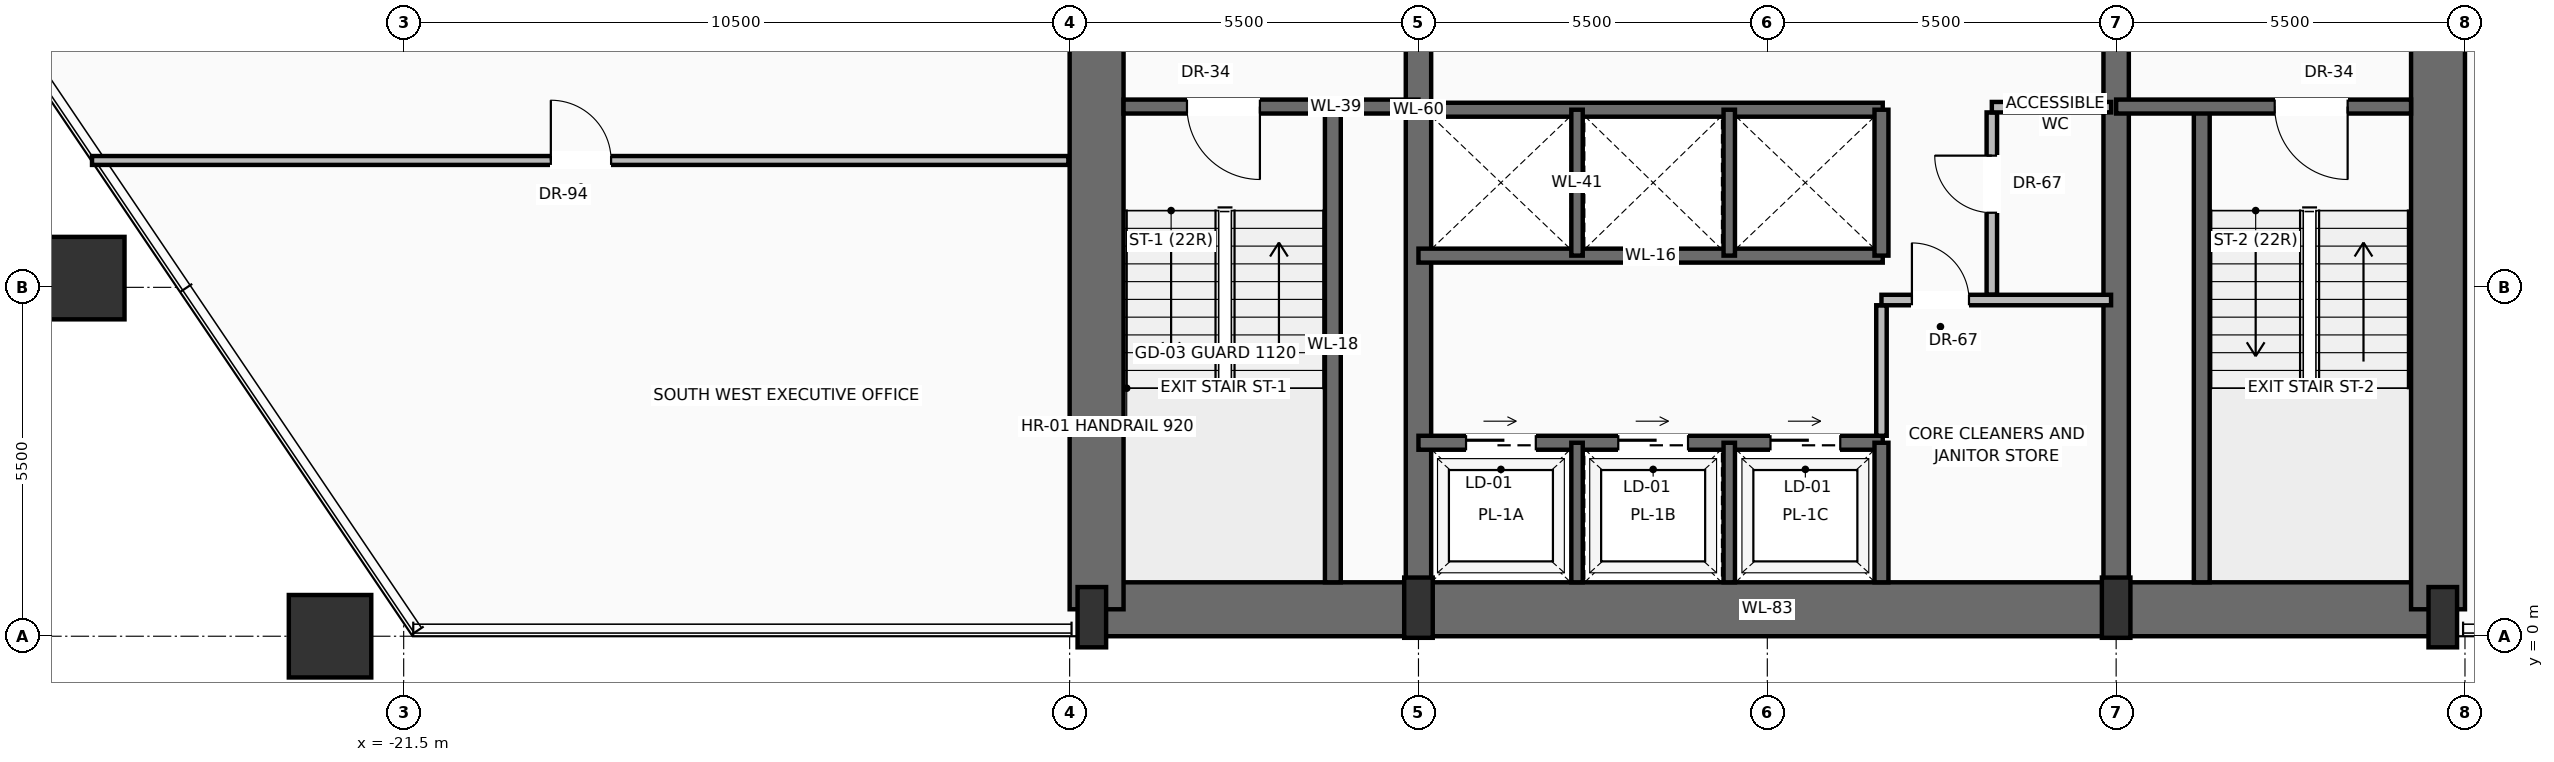
"""IFC4 building model, lengths in metres.
Left out: names, types, materials, properties, quantities, classifications, styles, units other than length and angle.
Written with IfcOpenShell. Run it as: python <this file> out.ifc"""

import sys

from ifc_helpers import new_model, si_unit, direction, frame, frame_2d, origin, origin_2d, place, context, subcontext, project, spatial, rectangle, hollow_rectangle, extrude, source, transform, mapped, element, fill, save


model = new_model("IFC4")
c1 = context("Model", 3, precision=1e-05, world=origin(), true_north=direction((0.0, 1.0)))
c2 = subcontext(c1, "Body", "Model", "MODEL_VIEW")
j1 = project(units=[si_unit("LENGTHUNIT", "METRE"), si_unit("PLANEANGLEUNIT", "RADIAN")], contexts=[c1])
p1 = place(None, origin())
s1 = spatial("IfcSite", under=j1, at=p1, CompositionType="ELEMENT")
p2 = place(p1, origin())
s2 = spatial("IfcBuilding", under=s1, at=p2, CompositionType="ELEMENT")
p3 = place(p2, frame((0.0, 0.0, 38.6)))
s3 = spatial("IfcBuildingStorey", under=s2, at=p3, CompositionType="ELEMENT", Elevation=38.6)
p4 = place(p3, frame((-10.65, 0.425, 0.0), z_axis=(0.0, 0.0, 1.0), x_axis=(1.0, 0.0, 0.0)))
e1 = element("IfcWall", 1, at=p4, inside=s3, PredefinedType="SHEAR", context=c2, shape_type="SweptSolid", body=[
    extrude(rectangle(XDim=21.3, YDim=0.85, at=frame_2d((10.65, 0.0))), origin(), (0.0, 0.0, 1.0), 3.45),
])
for number, where, z_axis, x_axis in (
    (2, (-10.575, 0.425, 0.0), (0.0, 0.0, 1.0), (0.0, 1.0, 0.0)),
    (3, (10.575, 0.425, 0.0), (0.0, 0.0, 1.0), (0.0, 1.0, 0.0)),
):
    element("IfcWall", number, at=place(p3, frame(where, z_axis=z_axis, x_axis=x_axis)), inside=s3, PredefinedType="SHEAR", context=c2, shape_type="SweptSolid", body=[
        extrude(rectangle(XDim=15.75, YDim=0.85, at=frame_2d((7.875, 0.0))), origin(), (0.0, 0.0, 1.0), 3.45),
    ])
p5 = place(p3, frame((-5.5, 0.425, 0.0), z_axis=(0.0, 0.0, 1.0), x_axis=(0.0, 1.0, 0.0)))
e4 = element("IfcWall", 4, at=p5, inside=s3, PredefinedType="SHEAR", context=c2, shape_type="SweptSolid", body=[
    extrude(rectangle(XDim=15.75, YDim=0.4, at=frame_2d((7.875, 0.0))), origin(), (0.0, 0.0, 1.0), 3.45),
])
p6 = place(p5, frame((9.075, 0.0, 0.0)))
e5 = element("IfcOpeningElement", 5, at=p6, cuts=e4, PredefinedType="OPENING", context=c2, shape_type="SweptSolid", body=[
    extrude(rectangle(XDim=1.1, YDim=2.2, at=frame_2d((0.55, 1.1))), frame((0.0, 0.21, 0.0), z_axis=(0.0, -1.0, 0.0), x_axis=(1.0, 0.0, 0.0)), (0.0, 0.0, 1.0), 0.42),
])
p7 = place(p3, frame((5.5, 0.425, 0.0), z_axis=(0.0, 0.0, 1.0), x_axis=(0.0, 1.0, 0.0)))
e6 = element("IfcWall", 6, at=p7, inside=s3, PredefinedType="SHEAR", context=c2, shape_type="SweptSolid", body=[
    extrude(rectangle(XDim=15.75, YDim=0.4, at=frame_2d((7.875, 0.0))), origin(), (0.0, 0.0, 1.0), 3.45),
])
p8 = place(p7, frame((9.075, 0.0, 0.0)))
e7 = element("IfcOpeningElement", 7, at=p8, cuts=e6, PredefinedType="OPENING", context=c2, shape_type="SweptSolid", body=[
    extrude(rectangle(XDim=1.1, YDim=2.2, at=frame_2d((0.55, 1.1))), frame((0.0, 0.21, 0.0), z_axis=(0.0, -1.0, 0.0), x_axis=(1.0, 0.0, 0.0)), (0.0, 0.0, 1.0), 0.42),
])
m1 = source(origin(), c2, "Body", "SweptSolid", [
    extrude(rectangle(XDim=0.45, YDim=0.95, at=origin_2d()), origin(), (0.0, 0.0, 1.0), 3.7),
])
for number, where, z_axis, x_axis in (
    (8, (-10.65, 0.3, 0.0), (0.0, 0.0, 1.0), (1.0, 0.0, 0.0)),
    (9, (-5.5, 0.45, 0.0), (0.0, 0.0, 1.0), (1.0, 0.0, 0.0)),
    (10, (5.5, 0.45, 0.0), (0.0, 0.0, 1.0), (1.0, 0.0, 0.0)),
    (11, (10.65, 0.3, 0.0), (0.0, 0.0, 1.0), (1.0, 0.0, 0.0)),
):
    element("IfcColumn", number, at=place(p3, frame(where, z_axis=z_axis, x_axis=x_axis)), inside=s3, PredefinedType="PILASTER", context=c2, shape_type="MappedRepresentation", body=[
        mapped(m1, transform((0.0, 0.0, 0.0), scale=1.0)),
    ])
m2 = source(origin(), c2, "Body", "SweptSolid", [
    extrude(hollow_rectangle(XDim=1.3, YDim=1.3, WallThickness=0.065, at=origin_2d()), origin(), (0.0, 0.0, 1.0), 3.692),
])
p9 = place(p3, frame((-22.661, 0.0, 0.004), z_axis=(-0.018847104809, 0.0, 0.999822377545), x_axis=(0.0, -1.0, 0.0)))
e12 = element("IfcColumn", 12, at=p9, inside=s3, PredefinedType="COLUMN", context=c2, shape_type="MappedRepresentation", body=[
    mapped(m2, transform((0.0, 0.0, 0.0), scale=1.0)),
])
m3 = source(origin(), c2, "Body", "SweptSolid", [
    extrude(hollow_rectangle(XDim=1.3, YDim=1.3, WallThickness=0.065, at=origin_2d()), origin(), (0.0, 0.0, 1.0), 3.692),
])
p10 = place(p3, frame((-26.552, 5.646, 0.004), z_axis=(-0.003438820357, -0.017723151073, 0.999837018934), x_axis=(0.981691567677, -0.190477468355, 0.0)))
e13 = element("IfcColumn", 13, at=p10, inside=s3, PredefinedType="COLUMN", context=c2, shape_type="MappedRepresentation", body=[
    mapped(m3, transform((0.0, 0.0, 0.0), scale=1.0)),
])
p11 = place(p3, frame((-6.85, 0.85, 0.0), z_axis=(0.0, 0.0, 1.0), x_axis=(0.0, 1.0, 0.0)))
e14 = element("IfcWall", 14, at=p11, inside=s3, PredefinedType="SOLIDWALL", context=c2, shape_type="SweptSolid", body=[
    extrude(rectangle(XDim=7.5, YDim=0.25, at=frame_2d((3.75, 0.0))), origin(), (0.0, 0.0, 1.0), 3.45),
])
p12 = place(p3, frame((-5.5, 8.35, 0.0), z_axis=(0.0, 0.0, 1.0), x_axis=(-1.0, 0.0, 0.0)))
e15 = element("IfcWall", 15, at=p12, inside=s3, PredefinedType="SOLIDWALL", context=c2, shape_type="SweptSolid", body=[
    extrude(rectangle(XDim=4.65, YDim=0.22, at=frame_2d((2.325, 0.0))), origin(), (0.0, 0.0, 1.0), 3.45),
])
p13 = place(p12, frame((2.5, 0.0, 0.0)))
e16 = element("IfcOpeningElement", 16, at=p13, cuts=e15, PredefinedType="OPENING", context=c2, shape_type="SweptSolid", body=[
    extrude(rectangle(XDim=1.15, YDim=2.2, at=frame_2d((0.575, 1.1))), frame((0.0, 0.12, 0.0), z_axis=(0.0, -1.0, 0.0), x_axis=(1.0, 0.0, 0.0)), (0.0, 0.0, 1.0), 0.24),
])
p14 = place(p3, frame((6.85, 0.85, 0.0), z_axis=(0.0, 0.0, 1.0), x_axis=(0.0, 1.0, 0.0)))
e17 = element("IfcWall", 17, at=p14, inside=s3, PredefinedType="SOLIDWALL", context=c2, shape_type="SweptSolid", body=[
    extrude(rectangle(XDim=7.5, YDim=0.25, at=frame_2d((3.75, 0.0))), origin(), (0.0, 0.0, 1.0), 3.45),
])
p15 = place(p3, frame((10.15, 8.35, 0.0), z_axis=(0.0, 0.0, 1.0), x_axis=(-1.0, 0.0, 0.0)))
e18 = element("IfcWall", 18, at=p15, inside=s3, PredefinedType="SOLIDWALL", context=c2, shape_type="SweptSolid", body=[
    extrude(rectangle(XDim=4.65, YDim=0.22, at=frame_2d((2.325, 0.0))), origin(), (0.0, 0.0, 1.0), 3.45),
])
p16 = place(p15, frame((1.0, 0.0, 0.0)))
e19 = element("IfcOpeningElement", 19, at=p16, cuts=e18, PredefinedType="OPENING", context=c2, shape_type="SweptSolid", body=[
    extrude(rectangle(XDim=1.15, YDim=2.2, at=frame_2d((0.575, 1.1))), frame((0.0, 0.12, 0.0), z_axis=(0.0, -1.0, 0.0), x_axis=(1.0, 0.0, 0.0)), (0.0, 0.0, 1.0), 0.24),
])
p17 = place(p3, frame((-5.5, 3.05, 0.0), z_axis=(0.0, 0.0, 1.0), x_axis=(1.0, 0.0, 0.0)))
e20 = element("IfcWall", 20, at=p17, inside=s3, PredefinedType="SOLIDWALL", context=c2, shape_type="SweptSolid", body=[
    extrude(rectangle(XDim=7.32, YDim=0.22, at=frame_2d((3.66, 0.0))), origin(), (0.0, 0.0, 1.0), 3.45),
])
p18 = place(p17, frame((0.75, 0.0, 0.0)))
e21 = element("IfcOpeningElement", 21, at=p18, cuts=e20, PredefinedType="OPENING", context=c2, shape_type="SweptSolid", body=[
    extrude(rectangle(XDim=1.1, YDim=2.2, at=frame_2d((0.55, 1.1))), frame((0.0, 0.12, 0.0), z_axis=(0.0, -1.0, 0.0), x_axis=(1.0, 0.0, 0.0)), (0.0, 0.0, 1.0), 0.24),
])
p19 = place(p17, frame((3.15, 0.0, 0.0)))
e22 = element("IfcOpeningElement", 22, at=p19, cuts=e20, PredefinedType="OPENING", context=c2, shape_type="SweptSolid", body=[
    extrude(rectangle(XDim=1.1, YDim=2.2, at=frame_2d((0.55, 1.1))), frame((0.0, 0.12, 0.0), z_axis=(0.0, -1.0, 0.0), x_axis=(1.0, 0.0, 0.0)), (0.0, 0.0, 1.0), 0.24),
])
p20 = place(p17, frame((5.55, 0.0, 0.0)))
e23 = element("IfcOpeningElement", 23, at=p20, cuts=e20, PredefinedType="OPENING", context=c2, shape_type="SweptSolid", body=[
    extrude(rectangle(XDim=1.1, YDim=2.2, at=frame_2d((0.55, 1.1))), frame((0.0, 0.12, 0.0), z_axis=(0.0, -1.0, 0.0), x_axis=(1.0, 0.0, 0.0)), (0.0, 0.0, 1.0), 0.24),
])
p21 = place(p3, frame((1.8, 0.85, 0.0), z_axis=(0.0, 0.0, 1.0), x_axis=(0.0, 1.0, 0.0)))
e24 = element("IfcWall", 24, at=p21, inside=s3, PredefinedType="SOLIDWALL", context=c2, shape_type="SweptSolid", body=[
    extrude(rectangle(XDim=2.2, YDim=0.22, at=frame_2d((1.1, 0.0))), origin(), (0.0, 0.0, 1.0), 3.45),
])
for number, where, z_axis, x_axis in (
    (25, (-3.0, 0.85, 0.0), (0.0, 0.0, 1.0), (0.0, 1.0, 0.0)),
    (26, (-0.6, 0.85, 0.0), (0.0, 0.0, 1.0), (0.0, 1.0, 0.0)),
):
    element("IfcWall", number, at=place(p3, frame(where, z_axis=z_axis, x_axis=x_axis)), inside=s3, PredefinedType="SOLIDWALL", context=c2, shape_type="SweptSolid", body=[
        extrude(rectangle(XDim=2.2, YDim=0.18, at=frame_2d((1.1, 0.0))), origin(), (0.0, 0.0, 1.0), 3.45),
    ])
p22 = place(p3, frame((1.8, 3.16, 0.0), z_axis=(0.0, 0.0, 1.0), x_axis=(0.0, 1.0, 0.0)))
e27 = element("IfcWall", 27, at=p22, inside=s3, PredefinedType="PARTITIONING", context=c2, shape_type="SweptSolid", body=[
    extrude(rectangle(XDim=2.058, YDim=0.165, at=frame_2d((1.029, 0.0))), origin(), (0.0, 0.0, 1.0), 3.442),
])
p23 = place(p3, frame((3.54, 5.383, 0.0), z_axis=(0.0, 0.0, 1.0), x_axis=(0.0, 1.0, 0.0)))
e28 = element("IfcWall", 28, at=p23, inside=s3, PredefinedType="PARTITIONING", context=c2, shape_type="SweptSolid", body=[
    extrude(rectangle(XDim=2.875, YDim=0.165, at=frame_2d((1.438, 0.0))), origin(), (0.0, 0.0, 1.0), 3.442),
])
p24 = place(p23, frame((1.294, 0.0, 0.0)))
e29 = element("IfcOpeningElement", 29, at=p24, cuts=e28, PredefinedType="OPENING", context=c2, shape_type="SweptSolid", body=[
    extrude(rectangle(XDim=0.9, YDim=2.1, at=frame_2d((0.45, 1.05))), frame((0.0, 0.093, 0.0), z_axis=(0.0, -1.0, 0.0), x_axis=(1.0, 0.0, 0.0)), (0.0, 0.0, 1.0), 0.185),
])
p25 = place(p3, frame((3.54, 8.34, 0.0), z_axis=(0.0, 0.0, 1.0), x_axis=(1.0, 0.0, 0.0)))
e30 = element("IfcWall", 30, at=p25, inside=s3, PredefinedType="PARTITIONING", context=c2, shape_type="SweptSolid", body=[
    extrude(rectangle(XDim=1.88, YDim=0.165, at=frame_2d((0.94, 0.0))), origin(), (0.0, 0.0, 1.0), 3.442),
])
p26 = place(p3, frame((1.8, 5.3, 0.0), z_axis=(0.0, 0.0, 1.0), x_axis=(1.0, 0.0, 0.0)))
e31 = element("IfcWall", 31, at=p26, inside=s3, PredefinedType="PARTITIONING", context=c2, shape_type="SweptSolid", body=[
    extrude(rectangle(XDim=3.62, YDim=0.165, at=frame_2d((1.81, 0.0))), origin(), (0.0, 0.0, 1.0), 3.442),
])
p27 = place(p26, frame((0.48, 0.0, 0.0)))
e32 = element("IfcOpeningElement", 32, at=p27, cuts=e31, PredefinedType="OPENING", context=c2, shape_type="SweptSolid", body=[
    extrude(rectangle(XDim=0.9, YDim=2.1, at=frame_2d((0.45, 1.05))), frame((0.0, 0.093, 0.0), z_axis=(0.0, -1.0, 0.0), x_axis=(1.0, 0.0, 0.0)), (0.0, 0.0, 1.0), 0.185),
])
for number, where, z_axis, x_axis in (
    (33, (-5.5, 6.0, 0.0), (0.0, 0.0, 1.0), (1.0, 0.0, 0.0)),
    (34, (-5.5, 8.3, 0.0), (0.0, 0.0, 1.0), (1.0, 0.0, 0.0)),
):
    element("IfcWall", number, at=place(p3, frame(where, z_axis=z_axis, x_axis=x_axis)), inside=s3, PredefinedType="SOLIDWALL", context=c2, shape_type="SweptSolid", body=[
        extrude(rectangle(XDim=7.32, YDim=0.22, at=frame_2d((3.66, 0.0))), origin(), (0.0, 0.0, 1.0), 3.45),
    ])
p28 = place(p3, frame((1.8, 6.0, 0.0), z_axis=(0.0, 0.0, 1.0), x_axis=(0.0, 1.0, 0.0)))
e35 = element("IfcWall", 35, at=p28, inside=s3, PredefinedType="SOLIDWALL", context=c2, shape_type="SweptSolid", body=[
    extrude(rectangle(XDim=2.3, YDim=0.22, at=frame_2d((1.15, 0.0))), origin(), (0.0, 0.0, 1.0), 3.45),
])
for number, where, z_axis, x_axis in (
    (36, (-3.0, 6.0, 0.0), (0.0, 0.0, 1.0), (0.0, 1.0, 0.0)),
    (37, (-0.6, 6.0, 0.0), (0.0, 0.0, 1.0), (0.0, 1.0, 0.0)),
):
    element("IfcWall", number, at=place(p3, frame(where, z_axis=z_axis, x_axis=x_axis)), inside=s3, PredefinedType="SOLIDWALL", context=c2, shape_type="SweptSolid", body=[
        extrude(rectangle(XDim=2.3, YDim=0.18, at=frame_2d((1.15, 0.0))), origin(), (0.0, 0.0, 1.0), 3.45),
    ])
p29 = place(p3, frame((-26.414, 7.5, 0.0), z_axis=(0.0, 0.0, 1.0), x_axis=(1.0, 0.0, 0.0)))
e38 = element("IfcWall", 38, at=p29, inside=s3, PredefinedType="PARTITIONING", context=c2, shape_type="SweptSolid", body=[
    extrude(rectangle(XDim=15.394, YDim=0.14, at=frame_2d((7.697, 0.0))), origin(), (0.0, 0.0, 1.0), 2.979),
])
p30 = place(p29, frame((7.234, 0.0, 0.0)))
e39 = element("IfcOpeningElement", 39, at=p30, cuts=e38, PredefinedType="OPENING", context=c2, shape_type="SweptSolid", body=[
    extrude(rectangle(XDim=0.95, YDim=2.2, at=frame_2d((0.475, 1.1))), frame((0.0, 0.08, 0.0), z_axis=(0.0, -1.0, 0.0), x_axis=(1.0, 0.0, 0.0)), (0.0, 0.0, 1.0), 0.16),
])
m4 = source(origin(), c2, "Body", "SweptSolid", [
    extrude(rectangle(XDim=1.15, YDim=2.2, at=frame_2d((0.575, 1.1))), frame((0.0, 0.025, 0.0), z_axis=(0.0, -1.0, 0.0), x_axis=(1.0, 0.0, 0.0)), (0.0, 0.0, 1.0), 0.05),
])
p31 = place(p13, origin())
e40 = element("IfcDoor", 40, at=p31, inside=s3, OperationType="SINGLE_SWING_LEFT", PredefinedType="DOOR", context=c2, shape_type="MappedRepresentation", body=[
    mapped(m4, transform((0.0, 0.0, 0.0), scale=1.0)),
])
fill(e16, e40)
p32 = place(p16, origin())
e41 = element("IfcDoor", 41, at=p32, inside=s3, OperationType="SINGLE_SWING_LEFT", PredefinedType="DOOR", context=c2, shape_type="MappedRepresentation", body=[
    mapped(m4, transform((0.0, 0.0, 0.0), scale=1.0)),
])
fill(e19, e41)
m5 = source(origin(), c2, "Body", "SweptSolid", [
    extrude(rectangle(XDim=1.1, YDim=2.2, at=frame_2d((0.55, 1.1))), frame((0.0, 0.025, 0.0), z_axis=(0.0, -1.0, 0.0), x_axis=(1.0, 0.0, 0.0)), (0.0, 0.0, 1.0), 0.05),
])
p33 = place(p18, origin())
e42 = element("IfcDoor", 42, at=p33, inside=s3, OperationType="SLIDING_TO_RIGHT", PredefinedType="DOOR", context=c2, shape_type="MappedRepresentation", body=[
    mapped(m5, transform((0.0, 0.0, 0.0), scale=1.0)),
])
fill(e21, e42)
p34 = place(p19, origin())
e43 = element("IfcDoor", 43, at=p34, inside=s3, OperationType="SLIDING_TO_RIGHT", PredefinedType="DOOR", context=c2, shape_type="MappedRepresentation", body=[
    mapped(m5, transform((0.0, 0.0, 0.0), scale=1.0)),
])
fill(e22, e43)
p35 = place(p20, origin())
e44 = element("IfcDoor", 44, at=p35, inside=s3, OperationType="SLIDING_TO_RIGHT", PredefinedType="DOOR", context=c2, shape_type="MappedRepresentation", body=[
    mapped(m5, transform((0.0, 0.0, 0.0), scale=1.0)),
])
fill(e23, e44)
m6 = source(origin(), c2, "Body", "SweptSolid", [
    extrude(rectangle(XDim=0.9, YDim=2.1, at=frame_2d((0.45, 1.05))), frame((0.0, 0.025, 0.0), z_axis=(0.0, -1.0, 0.0), x_axis=(1.0, 0.0, 0.0)), (0.0, 0.0, 1.0), 0.05),
])
p36 = place(p27, origin())
e45 = element("IfcDoor", 45, at=p36, inside=s3, OperationType="SINGLE_SWING_LEFT", PredefinedType="DOOR", context=c2, shape_type="MappedRepresentation", body=[
    mapped(m6, transform((0.0, 0.0, 0.0), scale=1.0)),
])
fill(e32, e45)
p37 = place(p24, origin())
e46 = element("IfcDoor", 46, at=p37, inside=s3, OperationType="SINGLE_SWING_RIGHT", PredefinedType="DOOR", context=c2, shape_type="MappedRepresentation", body=[
    mapped(m6, transform((0.0, 0.0, 0.0), scale=1.0)),
])
fill(e29, e46)
m7 = source(origin(), c2, "Body", "SweptSolid", [
    extrude(rectangle(XDim=0.95, YDim=2.2, at=frame_2d((0.475, 1.1))), frame((0.0, 0.025, 0.0), z_axis=(0.0, -1.0, 0.0), x_axis=(1.0, 0.0, 0.0)), (0.0, 0.0, 1.0), 0.05),
])
p38 = place(p30, origin())
e47 = element("IfcDoor", 47, at=p38, inside=s3, OperationType="SINGLE_SWING_LEFT", PredefinedType="DOOR", context=c2, shape_type="MappedRepresentation", body=[
    mapped(m7, transform((0.0, 0.0, 0.0), scale=1.0)),
])
fill(e39, e47)
save(model, sys.argv[1])
